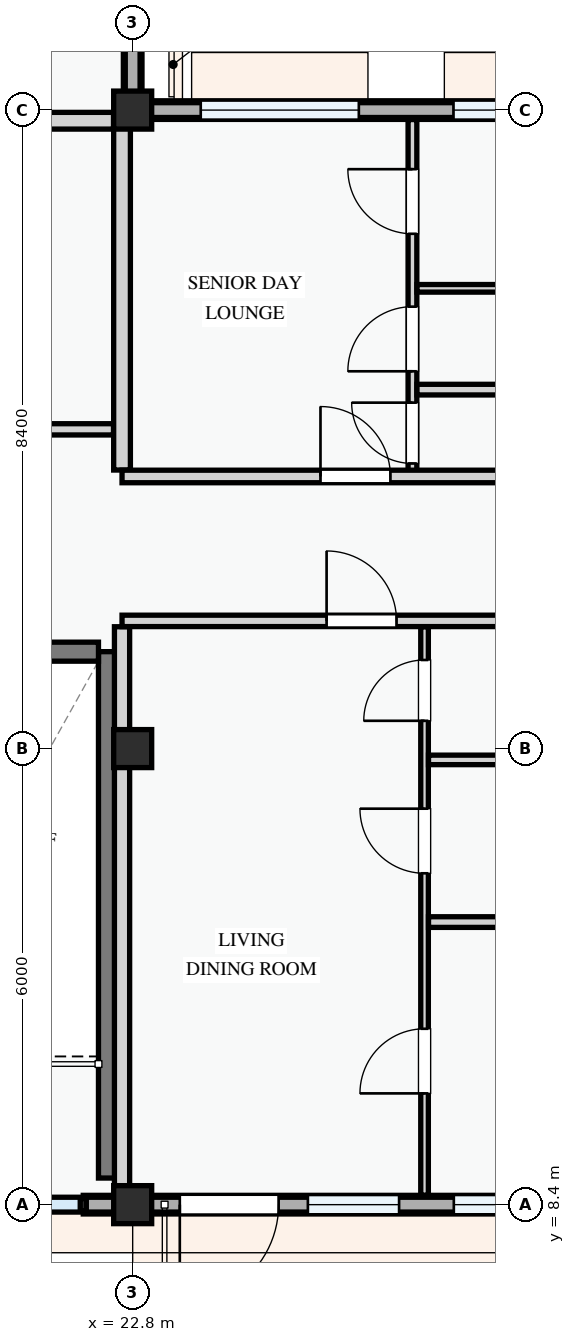
"""IFC4 building model, lengths in metres.
Left out: names, types, materials, properties, quantities, classifications, styles, units other than length and angle.
Written with IfcOpenShell. Run it as: python <this file> out.ifc"""

import sys

from ifc_helpers import new_model, si_unit, direction, frame, frame_2d, origin, origin_2d, place, context, subcontext, project, spatial, polyline, rectangle, outline, extrude, element, fill, save


model = new_model("IFC4")
c1 = context("Model", 3, precision=1e-05, world=origin(), true_north=direction((0.0, 1.0)))
c2 = subcontext(c1, "Body", "Model", "MODEL_VIEW")
j1 = project(units=[si_unit("LENGTHUNIT", "METRE"), si_unit("PLANEANGLEUNIT", "RADIAN")], contexts=[c1])
p1 = place(None, origin())
s1 = spatial("IfcSite", under=j1, at=p1, CompositionType="ELEMENT")
p2 = place(p1, origin())
s2 = spatial("IfcBuilding", under=s1, at=p2, CompositionType="ELEMENT")
p3 = place(p2, frame((0.0, 0.0, 34.5)))
s3 = spatial("IfcBuildingStorey", under=s2, at=p3, CompositionType="ELEMENT", Elevation=34.5)
for number, where, z_axis, x_axis in (
    (1, (22.8, 8.4, 0.0), (0.0, 0.0, 1.0), (1.0, 0.0, 0.0)),
    (2, (22.8, 14.4, 0.0), (0.0, 0.0, 1.0), (1.0, 0.0, 0.0)),
    (3, (22.8, 22.8, 0.0), (0.0, 0.0, 1.0), (1.0, 0.0, 0.0)),
):
    element("IfcColumn", number, at=place(p3, frame(where, z_axis=z_axis, x_axis=x_axis)), inside=s3, PredefinedType="COLUMN", context=c2, shape_type="SweptSolid", body=[
        extrude(rectangle(XDim=0.5, YDim=0.5, at=origin_2d()), origin(), (0.0, 0.0, 1.0), 3.3),
    ])
p4 = place(p3, frame((22.8, 22.8, 0.0), z_axis=(0.0, 0.0, 1.0), x_axis=(0.0, 1.0, 0.0)))
e4 = element("IfcWall", 4, at=p4, inside=s3, PredefinedType="STANDARD", context=c2, shape_type="SweptSolid", body=[
    extrude(rectangle(XDim=6.0, YDim=0.245, at=frame_2d((3.0, 0.0))), origin(), (0.0, 0.0, 1.0), 2.575),
])
p5 = place(p4, frame((1.285, 0.0, 0.78)))
e5 = element("IfcOpeningElement", 5, at=p5, cuts=e4, PredefinedType="OPENING", context=c2, shape_type="SweptSolid", body=[
    extrude(rectangle(XDim=1.3, YDim=1.4, at=frame_2d((0.65, 0.7))), frame((0.0, 0.133, 0.0), z_axis=(0.0, -1.0, 0.0), x_axis=(1.0, 0.0, 0.0)), (0.0, 0.0, 1.0), 0.265),
])
p6 = place(p4, frame((4.271, 0.0, 0.78)))
e6 = element("IfcOpeningElement", 6, at=p6, cuts=e4, PredefinedType="OPENING", context=c2, shape_type="SweptSolid", body=[
    extrude(rectangle(XDim=0.95, YDim=1.15, at=frame_2d((0.475, 0.575))), frame((0.0, 0.133, 0.0), z_axis=(0.0, -1.0, 0.0), x_axis=(1.0, 0.0, 0.0)), (0.0, 0.0, 1.0), 0.265),
])
p7 = place(p3, frame((22.15, 8.4, 0.0), z_axis=(0.0, 0.0, 1.0), x_axis=(1.0, 0.0, 0.0)))
e7 = element("IfcWall", 7, at=p7, inside=s3, PredefinedType="STANDARD", context=c2, shape_type="SweptSolid", body=[
    extrude(rectangle(XDim=0.65, YDim=0.245, at=frame_2d((0.325, 0.0))), origin(), (0.0, 0.0, 1.0), 3.04),
])
p8 = place(p3, frame((22.8, 8.4, 0.0), z_axis=(0.0, 0.0, 1.0), x_axis=(1.0, 0.0, 0.0)))
e8 = element("IfcWall", 8, at=p8, inside=s3, PredefinedType="STANDARD", context=c2, shape_type="SweptSolid", body=[
    extrude(rectangle(XDim=6.0, YDim=0.245, at=frame_2d((3.0, 0.0))), origin(), (0.0, 0.0, 1.0), 2.525),
])
p9 = place(p8, frame((0.62, 0.0, 0.0)))
e9 = element("IfcOpeningElement", 9, at=p9, cuts=e8, PredefinedType="OPENING", context=c2, shape_type="SweptSolid", body=[
    extrude(rectangle(XDim=1.3, YDim=2.15, at=frame_2d((0.65, 1.075))), frame((0.0, 0.133, 0.0), z_axis=(0.0, -1.0, 0.0), x_axis=(1.0, 0.0, 0.0)), (0.0, 0.0, 1.0), 0.265),
])
p10 = place(p8, frame((2.305, 0.0, 0.78)))
e10 = element("IfcOpeningElement", 10, at=p10, cuts=e8, PredefinedType="OPENING", context=c2, shape_type="SweptSolid", body=[
    extrude(rectangle(XDim=1.2, YDim=1.5, at=frame_2d((0.6, 0.75))), frame((0.0, 0.133, 0.0), z_axis=(0.0, -1.0, 0.0), x_axis=(1.0, 0.0, 0.0)), (0.0, 0.0, 1.0), 0.265),
])
p11 = place(p8, frame((4.225, 0.0, 0.78)))
e11 = element("IfcOpeningElement", 11, at=p11, cuts=e8, PredefinedType="OPENING", context=c2, shape_type="SweptSolid", body=[
    extrude(rectangle(XDim=1.2, YDim=1.35, at=frame_2d((0.6, 0.675))), frame((0.0, 0.133, 0.0), z_axis=(0.0, -1.0, 0.0), x_axis=(1.0, 0.0, 0.0)), (0.0, 0.0, 1.0), 0.265),
])
p12 = place(p3, frame((28.8, 22.8, 0.0), z_axis=(0.0, 0.0, 1.0), x_axis=(-1.0, 0.0, 0.0)))
e12 = element("IfcWall", 12, at=p12, inside=s3, PredefinedType="STANDARD", context=c2, shape_type="SweptSolid", body=[
    extrude(rectangle(XDim=6.0, YDim=0.245, at=frame_2d((3.0, 0.0))), origin(), (0.0, 0.0, 1.0), 2.525),
])
p13 = place(p12, frame((0.729, 0.0, 0.78)))
e13 = element("IfcOpeningElement", 13, at=p13, cuts=e12, PredefinedType="OPENING", context=c2, shape_type="SweptSolid", body=[
    extrude(rectangle(XDim=1.05, YDim=1.2, at=frame_2d((0.525, 0.6))), frame((0.0, 0.133, 0.0), z_axis=(0.0, -1.0, 0.0), x_axis=(1.0, 0.0, 0.0)), (0.0, 0.0, 1.0), 0.265),
])
p14 = place(p12, frame((3.025, 0.0, 0.78)))
e14 = element("IfcOpeningElement", 14, at=p14, cuts=e12, PredefinedType="OPENING", context=c2, shape_type="SweptSolid", body=[
    extrude(rectangle(XDim=2.08, YDim=1.52, at=frame_2d((1.04, 0.76))), frame((0.0, 0.133, 0.0), z_axis=(0.0, -1.0, 0.0), x_axis=(1.0, 0.0, 0.0)), (0.0, 0.0, 1.0), 0.265),
])
p15 = place(p3, frame((22.8, 22.8, 3.3), z_axis=(0.0, 0.0, 1.0), x_axis=(0.0, 1.0, 0.0)))
e15 = element("IfcWall", 15, at=p15, inside=s3, PredefinedType="PARAPET", context=c2, shape_type="SweptSolid", body=[
    extrude(rectangle(XDim=20.4, YDim=0.195, at=frame_2d((10.2, 0.0))), origin(), (0.0, 0.0, 1.0), 1.15),
])
p16 = place(p3, frame((14.4, 8.4, 3.3), z_axis=(0.0, 0.0, 1.0), x_axis=(1.0, 0.0, 0.0)))
e16 = element("IfcWall", 16, at=p16, inside=s3, PredefinedType="PARAPET", context=c2, shape_type="SweptSolid", body=[
    extrude(outline(polyline([(0.0, 0.0), (8.4, 0.0), (8.4, 1.12), (7.7, 1.322), (7.0, 1.484), (6.3, 1.618), (5.6, 1.717), (4.9, 1.779), (4.2, 1.8), (3.5, 1.779), (2.8, 1.717), (2.1, 1.618), (1.4, 1.484), (0.7, 1.322), (0.0, 1.12), (0.0, 0.0)])), frame((0.0, 0.098, 0.0), z_axis=(0.0, -1.0, 0.0), x_axis=(1.0, 0.0, 0.0)), (0.0, 0.0, 1.0), 0.195),
])
p17 = place(p3, frame((22.8, 8.4, 3.3), z_axis=(0.0, 0.0, 1.0), x_axis=(1.0, 0.0, 0.0)))
e17 = element("IfcWall", 17, at=p17, inside=s3, PredefinedType="PARAPET", context=c2, shape_type="SweptSolid", body=[
    extrude(outline(polyline([(0.0, 0.0), (6.0, 0.0), (6.0, 1.12), (5.5, 1.322), (5.0, 1.484), (4.5, 1.618), (4.0, 1.717), (3.5, 1.779), (3.0, 1.8), (2.5, 1.779), (2.0, 1.717), (1.5, 1.618), (1.0, 1.484), (0.5, 1.322), (0.0, 1.12), (0.0, 0.0)])), frame((0.0, 0.098, 0.0), z_axis=(0.0, -1.0, 0.0), x_axis=(1.0, 0.0, 0.0)), (0.0, 0.0, 1.0), 0.195),
])
p18 = place(p3, frame((43.2, 22.8, 3.3), z_axis=(0.0, 0.0, 1.0), x_axis=(-1.0, 0.0, 0.0)))
e18 = element("IfcWall", 18, at=p18, inside=s3, PredefinedType="PARAPET", context=c2, shape_type="SweptSolid", body=[
    extrude(rectangle(XDim=20.4, YDim=0.195, at=frame_2d((10.2, 0.0))), origin(), (0.0, 0.0, 1.0), 1.15),
])
p19 = place(p3, frame((22.475, 8.75, 0.0), z_axis=(0.0, 0.0, 1.0), x_axis=(0.0, 1.0, 0.0)))
e19 = element("IfcWall", 19, at=p19, inside=s3, PredefinedType="SHEAR", context=c2, shape_type="SweptSolid", body=[
    extrude(rectangle(XDim=6.925, YDim=0.25, at=frame_2d((3.462, 0.0))), origin(), (0.0, 0.0, 1.0), 3.0),
])
p20 = place(p3, frame((8.85, 15.675, 0.0), z_axis=(0.0, 0.0, 1.0), x_axis=(1.0, 0.0, 0.0)))
e20 = element("IfcWall", 20, at=p20, inside=s3, PredefinedType="SHEAR", context=c2, shape_type="SweptSolid", body=[
    extrude(rectangle(XDim=13.5, YDim=0.25, at=frame_2d((6.75, 0.0))), origin(), (0.0, 0.0, 1.0), 3.0),
])
p21 = place(p20, frame((6.2, 0.0, 0.0)))
e21 = element("IfcOpeningElement", 21, at=p21, cuts=e20, PredefinedType="OPENING", context=c2, shape_type="SweptSolid", body=[
    extrude(rectangle(XDim=1.1, YDim=2.15, at=frame_2d((0.55, 1.075))), frame((0.0, 0.135, 0.0), z_axis=(0.0, -1.0, 0.0), x_axis=(1.0, 0.0, 0.0)), (0.0, 0.0, 1.0), 0.27),
])
p22 = place(p3, frame((18.025, 18.6, 0.0), z_axis=(0.0, 0.0, 1.0), x_axis=(1.0, 0.0, 0.0)))
e22 = element("IfcWall", 22, at=p22, inside=s3, PredefinedType="PARTITIONING", context=c2, shape_type="SweptSolid", body=[
    extrude(rectangle(XDim=4.523, YDim=0.148, at=frame_2d((2.262, 0.0))), origin(), (0.0, 0.0, 1.0), 3.0),
])
p23 = place(p22, frame((1.65, 0.0, 0.0)))
e23 = element("IfcOpeningElement", 23, at=p23, cuts=e22, PredefinedType="OPENING", context=c2, shape_type="SweptSolid", body=[
    extrude(rectangle(XDim=1.0, YDim=2.15, at=frame_2d((0.5, 1.075))), frame((0.0, 0.084, 0.0), z_axis=(0.0, -1.0, 0.0), x_axis=(1.0, 0.0, 0.0)), (0.0, 0.0, 1.0), 0.168),
])
p24 = place(p3, frame((18.064, 22.66, 0.0), z_axis=(0.0, 0.0, 1.0), x_axis=(1.0, 0.0, 0.0)))
e24 = element("IfcWall", 24, at=p24, inside=s3, PredefinedType="PARTITIONING", context=c2, shape_type="SweptSolid", body=[
    extrude(rectangle(XDim=4.484, YDim=0.22, at=frame_2d((2.242, 0.0))), origin(), (0.0, 0.0, 1.0), 2.375),
])
p25 = place(p3, frame((26.64, 8.524, 0.0), z_axis=(0.0, 0.0, 1.0), x_axis=(0.0, 1.0, 0.0)))
e25 = element("IfcWall", 25, at=p25, inside=s3, PredefinedType="PARTITIONING", context=c2, shape_type="SweptSolid", body=[
    extrude(rectangle(XDim=7.479, YDim=0.1, at=frame_2d((3.739, 0.0))), origin(), (0.0, 0.0, 1.0), 3.0),
])
p26 = place(p25, frame((1.339, 0.0, 0.0)))
e26 = element("IfcOpeningElement", 26, at=p26, cuts=e25, PredefinedType="OPENING", context=c2, shape_type="SweptSolid", body=[
    extrude(rectangle(XDim=0.85, YDim=2.1, at=frame_2d((0.425, 1.05))), frame((0.0, 0.06, 0.0), z_axis=(0.0, -1.0, 0.0), x_axis=(1.0, 0.0, 0.0)), (0.0, 0.0, 1.0), 0.12),
])
p27 = place(p25, frame((4.235, 0.0, 0.0)))
e27 = element("IfcOpeningElement", 27, at=p27, cuts=e25, PredefinedType="OPENING", context=c2, shape_type="SweptSolid", body=[
    extrude(rectangle(XDim=0.85, YDim=2.1, at=frame_2d((0.425, 1.05))), frame((0.0, 0.06, 0.0), z_axis=(0.0, -1.0, 0.0), x_axis=(1.0, 0.0, 0.0)), (0.0, 0.0, 1.0), 0.12),
])
p28 = place(p25, frame((6.241, 0.0, 0.0)))
e28 = element("IfcOpeningElement", 28, at=p28, cuts=e25, PredefinedType="OPENING", context=c2, shape_type="SweptSolid", body=[
    extrude(rectangle(XDim=0.8, YDim=2.1, at=frame_2d((0.4, 1.05))), frame((0.0, 0.06, 0.0), z_axis=(0.0, -1.0, 0.0), x_axis=(1.0, 0.0, 0.0)), (0.0, 0.0, 1.0), 0.12),
])
p29 = place(p3, frame((26.692, 12.118, 0.0), z_axis=(0.0, 0.0, 1.0), x_axis=(1.0, 0.0, 0.0)))
e29 = element("IfcWall", 29, at=p29, inside=s3, PredefinedType="PARTITIONING", context=c2, shape_type="SweptSolid", body=[
    extrude(rectangle(XDim=3.833, YDim=0.14, at=frame_2d((1.917, 0.0))), origin(), (0.0, 0.0, 1.0), 3.0),
])
p30 = place(p3, frame((26.692, 14.251, 0.0), z_axis=(0.0, 0.0, 1.0), x_axis=(1.0, 0.0, 0.0)))
e30 = element("IfcWall", 30, at=p30, inside=s3, PredefinedType="PARTITIONING", context=c2, shape_type="SweptSolid", body=[
    extrude(rectangle(XDim=3.833, YDim=0.125, at=frame_2d((1.917, 0.0))), origin(), (0.0, 0.0, 1.0), 2.375),
])
p31 = place(p3, frame((26.481, 17.98, 0.0), z_axis=(0.0, 0.0, 1.0), x_axis=(0.0, 1.0, 0.0)))
e31 = element("IfcWall", 31, at=p31, inside=s3, PredefinedType="PARTITIONING", context=c2, shape_type="SweptSolid", body=[
    extrude(rectangle(XDim=4.696, YDim=0.115, at=frame_2d((2.348, 0.0))), origin(), (0.0, 0.0, 1.0), 3.0),
])
p32 = place(p31, frame((0.171, 0.0, 0.0)))
e32 = element("IfcOpeningElement", 32, at=p32, cuts=e31, PredefinedType="OPENING", context=c2, shape_type="SweptSolid", body=[
    extrude(rectangle(XDim=0.8, YDim=2.1, at=frame_2d((0.4, 1.05))), frame((0.0, 0.067, 0.0), z_axis=(0.0, -1.0, 0.0), x_axis=(1.0, 0.0, 0.0)), (0.0, 0.0, 1.0), 0.135),
])
p33 = place(p31, frame((1.384, 0.0, 0.0)))
e33 = element("IfcOpeningElement", 33, at=p33, cuts=e31, PredefinedType="OPENING", context=c2, shape_type="SweptSolid", body=[
    extrude(rectangle(XDim=0.85, YDim=2.1, at=frame_2d((0.425, 1.05))), frame((0.0, 0.067, 0.0), z_axis=(0.0, -1.0, 0.0), x_axis=(1.0, 0.0, 0.0)), (0.0, 0.0, 1.0), 0.135),
])
p34 = place(p31, frame((3.193, 0.0, 0.0)))
e34 = element("IfcOpeningElement", 34, at=p34, cuts=e31, PredefinedType="OPENING", context=c2, shape_type="SweptSolid", body=[
    extrude(rectangle(XDim=0.85, YDim=2.1, at=frame_2d((0.425, 1.05))), frame((0.0, 0.067, 0.0), z_axis=(0.0, -1.0, 0.0), x_axis=(1.0, 0.0, 0.0)), (0.0, 0.0, 1.0), 0.135),
])
p35 = place(p3, frame((26.54, 20.455, 0.0), z_axis=(0.0, 0.0, 1.0), x_axis=(1.0, 0.0, 0.0)))
e35 = element("IfcWall", 35, at=p35, inside=s3, PredefinedType="PARTITIONING", context=c2, shape_type="SweptSolid", body=[
    extrude(rectangle(XDim=3.978, YDim=0.1, at=frame_2d((1.989, 0.0))), origin(), (0.0, 0.0, 1.0), 3.0),
])
p36 = place(p3, frame((26.54, 19.122, 0.0), z_axis=(0.0, 0.0, 1.0), x_axis=(1.0, 0.0, 0.0)))
e36 = element("IfcWall", 36, at=p36, inside=s3, PredefinedType="PARTITIONING", context=c2, shape_type="SweptSolid", body=[
    extrude(rectangle(XDim=3.978, YDim=0.14, at=frame_2d((1.989, 0.0))), origin(), (0.0, 0.0, 1.0), 3.0),
])
p37 = place(p3, frame((22.66, 8.524, 0.0), z_axis=(0.0, 0.0, 1.0), x_axis=(0.0, 1.0, 0.0)))
e37 = element("IfcWall", 37, at=p37, inside=s3, PredefinedType="PARTITIONING", context=c2, shape_type="SweptSolid", body=[
    extrude(rectangle(XDim=7.479, YDim=0.2, at=frame_2d((3.739, 0.0))), origin(), (0.0, 0.0, 1.0), 2.425),
])
p38 = place(p3, frame((22.66, 18.064, 0.0), z_axis=(0.0, 0.0, 1.0), x_axis=(0.0, 1.0, 0.0)))
e38 = element("IfcWall", 38, at=p38, inside=s3, PredefinedType="PARTITIONING", context=c2, shape_type="SweptSolid", body=[
    extrude(rectangle(XDim=4.676, YDim=0.22, at=frame_2d((2.338, 0.0))), origin(), (0.0, 0.0, 1.0), 2.425),
])
p39 = place(p3, frame((22.66, 16.08, 0.0), z_axis=(0.0, 0.0, 1.0), x_axis=(1.0, 0.0, 0.0)))
e39 = element("IfcWall", 39, at=p39, inside=s3, PredefinedType="PARTITIONING", context=c2, shape_type="SweptSolid", body=[
    extrude(rectangle(XDim=20.416, YDim=0.15, at=frame_2d((10.208, 0.0))), origin(), (0.0, 0.0, 1.0), 3.0),
])
p40 = place(p39, frame((2.691, 0.0, 0.0)))
e40 = element("IfcOpeningElement", 40, at=p40, cuts=e39, PredefinedType="OPENING", context=c2, shape_type="SweptSolid", body=[
    extrude(rectangle(XDim=0.92, YDim=2.1, at=frame_2d((0.46, 1.05))), frame((0.0, 0.085, 0.0), z_axis=(0.0, -1.0, 0.0), x_axis=(1.0, 0.0, 0.0)), (0.0, 0.0, 1.0), 0.17),
])
p41 = place(p39, frame((9.91, 0.0, 0.0)))
e41 = element("IfcOpeningElement", 41, at=p41, cuts=e39, PredefinedType="OPENING", context=c2, shape_type="SweptSolid", body=[
    extrude(rectangle(XDim=0.92, YDim=2.1, at=frame_2d((0.46, 1.05))), frame((0.0, 0.085, 0.0), z_axis=(0.0, -1.0, 0.0), x_axis=(1.0, 0.0, 0.0)), (0.0, 0.0, 1.0), 0.17),
])
p42 = place(p3, frame((22.66, 17.98, 0.0), z_axis=(0.0, 0.0, 1.0), x_axis=(1.0, 0.0, 0.0)))
e42 = element("IfcWall", 42, at=p42, inside=s3, PredefinedType="PARTITIONING", context=c2, shape_type="SweptSolid", body=[
    extrude(rectangle(XDim=20.416, YDim=0.165, at=frame_2d((10.208, 0.0))), origin(), (0.0, 0.0, 1.0), 3.0),
])
p43 = place(p42, frame((2.611, 0.0, 0.0)))
e43 = element("IfcOpeningElement", 43, at=p43, cuts=e42, PredefinedType="OPENING", context=c2, shape_type="SweptSolid", body=[
    extrude(rectangle(XDim=0.92, YDim=2.1, at=frame_2d((0.46, 1.05))), frame((0.0, 0.093, 0.0), z_axis=(0.0, -1.0, 0.0), x_axis=(1.0, 0.0, 0.0)), (0.0, 0.0, 1.0), 0.185),
])
p44 = place(p42, frame((9.885, 0.0, 0.0)))
e44 = element("IfcOpeningElement", 44, at=p44, cuts=e42, PredefinedType="OPENING", context=c2, shape_type="SweptSolid", body=[
    extrude(rectangle(XDim=0.96, YDim=2.12, at=frame_2d((0.48, 1.06))), frame((0.0, 0.093, 0.0), z_axis=(0.0, -1.0, 0.0), x_axis=(1.0, 0.0, 0.0)), (0.0, 0.0, 1.0), 0.185),
])
p45 = place(p9, frame((1.3, 0.0, 0.0), z_axis=(0.0, 0.0, 1.0), x_axis=(-1.0, 0.0, 0.0)))
e45 = element("IfcDoor", 45, at=p45, inside=s3, OperationType="SINGLE_SWING_RIGHT", PredefinedType="DOOR", context=c2, shape_type="SweptSolid", body=[
    extrude(rectangle(XDim=1.3, YDim=2.15, at=frame_2d((0.65, 1.075))), frame((0.0, 0.025, 0.0), z_axis=(0.0, -1.0, 0.0), x_axis=(1.0, 0.0, 0.0)), (0.0, 0.0, 1.0), 0.05),
])
fill(e9, e45)
p46 = place(p10, origin())
e46 = element("IfcWindow", 46, at=p46, inside=s3, PartitioningType="SINGLE_PANEL", PredefinedType="WINDOW", context=c2, shape_type="SweptSolid", body=[
    extrude(rectangle(XDim=1.2, YDim=1.5, at=frame_2d((0.6, 0.75))), frame((0.0, 0.03, 0.0), z_axis=(0.0, -1.0, 0.0), x_axis=(1.0, 0.0, 0.0)), (0.0, 0.0, 1.0), 0.06),
])
fill(e10, e46)
p47 = place(p11, origin())
e47 = element("IfcWindow", 47, at=p47, inside=s3, PartitioningType="SINGLE_PANEL", PredefinedType="WINDOW", context=c2, shape_type="SweptSolid", body=[
    extrude(rectangle(XDim=1.2, YDim=1.35, at=frame_2d((0.6, 0.675))), frame((0.0, 0.03, 0.0), z_axis=(0.0, -1.0, 0.0), x_axis=(1.0, 0.0, 0.0)), (0.0, 0.0, 1.0), 0.06),
])
fill(e11, e47)
p48 = place(p13, origin())
e48 = element("IfcWindow", 48, at=p48, inside=s3, PartitioningType="SINGLE_PANEL", PredefinedType="WINDOW", context=c2, shape_type="SweptSolid", body=[
    extrude(rectangle(XDim=1.05, YDim=1.2, at=frame_2d((0.525, 0.6))), frame((0.0, 0.03, 0.0), z_axis=(0.0, -1.0, 0.0), x_axis=(1.0, 0.0, 0.0)), (0.0, 0.0, 1.0), 0.06),
])
fill(e13, e48)
p49 = place(p14, origin())
e49 = element("IfcWindow", 49, at=p49, inside=s3, PartitioningType="DOUBLE_PANEL_VERTICAL", PredefinedType="WINDOW", context=c2, shape_type="SweptSolid", body=[
    extrude(rectangle(XDim=2.08, YDim=1.52, at=frame_2d((1.04, 0.76))), frame((0.0, 0.03, 0.0), z_axis=(0.0, -1.0, 0.0), x_axis=(1.0, 0.0, 0.0)), (0.0, 0.0, 1.0), 0.06),
])
fill(e14, e49)
p50 = place(p26, origin())
e50 = element("IfcDoor", 50, at=p50, inside=s3, OperationType="SINGLE_SWING_LEFT", PredefinedType="DOOR", context=c2, shape_type="SweptSolid", body=[
    extrude(rectangle(XDim=0.85, YDim=2.1, at=frame_2d((0.425, 1.05))), frame((0.0, 0.025, 0.0), z_axis=(0.0, -1.0, 0.0), x_axis=(1.0, 0.0, 0.0)), (0.0, 0.0, 1.0), 0.05),
])
fill(e26, e50)
p51 = place(p27, origin())
e51 = element("IfcDoor", 51, at=p51, inside=s3, OperationType="SINGLE_SWING_RIGHT", PredefinedType="DOOR", context=c2, shape_type="SweptSolid", body=[
    extrude(rectangle(XDim=0.85, YDim=2.1, at=frame_2d((0.425, 1.05))), frame((0.0, 0.025, 0.0), z_axis=(0.0, -1.0, 0.0), x_axis=(1.0, 0.0, 0.0)), (0.0, 0.0, 1.0), 0.05),
])
fill(e27, e51)
p52 = place(p28, origin())
e52 = element("IfcDoor", 52, at=p52, inside=s3, OperationType="SINGLE_SWING_LEFT", PredefinedType="DOOR", context=c2, shape_type="SweptSolid", body=[
    extrude(rectangle(XDim=0.8, YDim=2.1, at=frame_2d((0.4, 1.05))), frame((0.0, 0.025, 0.0), z_axis=(0.0, -1.0, 0.0), x_axis=(1.0, 0.0, 0.0)), (0.0, 0.0, 1.0), 0.05),
])
fill(e28, e52)
p53 = place(p32, origin())
e53 = element("IfcDoor", 53, at=p53, inside=s3, OperationType="SINGLE_SWING_RIGHT", PredefinedType="DOOR", context=c2, shape_type="SweptSolid", body=[
    extrude(rectangle(XDim=0.8, YDim=2.1, at=frame_2d((0.4, 1.05))), frame((0.0, 0.025, 0.0), z_axis=(0.0, -1.0, 0.0), x_axis=(1.0, 0.0, 0.0)), (0.0, 0.0, 1.0), 0.05),
])
fill(e32, e53)
p54 = place(p33, origin())
e54 = element("IfcDoor", 54, at=p54, inside=s3, OperationType="SINGLE_SWING_LEFT", PredefinedType="DOOR", context=c2, shape_type="SweptSolid", body=[
    extrude(rectangle(XDim=0.85, YDim=2.1, at=frame_2d((0.425, 1.05))), frame((0.0, 0.025, 0.0), z_axis=(0.0, -1.0, 0.0), x_axis=(1.0, 0.0, 0.0)), (0.0, 0.0, 1.0), 0.05),
])
fill(e33, e54)
p55 = place(p34, origin())
e55 = element("IfcDoor", 55, at=p55, inside=s3, OperationType="SINGLE_SWING_RIGHT", PredefinedType="DOOR", context=c2, shape_type="SweptSolid", body=[
    extrude(rectangle(XDim=0.85, YDim=2.1, at=frame_2d((0.425, 1.05))), frame((0.0, 0.025, 0.0), z_axis=(0.0, -1.0, 0.0), x_axis=(1.0, 0.0, 0.0)), (0.0, 0.0, 1.0), 0.05),
])
fill(e34, e55)
p56 = place(p40, origin())
e56 = element("IfcDoor", 56, at=p56, inside=s3, OperationType="SINGLE_SWING_LEFT", PredefinedType="DOOR", context=c2, shape_type="SweptSolid", body=[
    extrude(rectangle(XDim=0.92, YDim=2.1, at=frame_2d((0.46, 1.05))), frame((0.0, 0.025, 0.0), z_axis=(0.0, -1.0, 0.0), x_axis=(1.0, 0.0, 0.0)), (0.0, 0.0, 1.0), 0.05),
])
fill(e40, e56)
p57 = place(p43, origin())
e57 = element("IfcDoor", 57, at=p57, inside=s3, OperationType="SINGLE_SWING_LEFT", PredefinedType="DOOR", context=c2, shape_type="SweptSolid", body=[
    extrude(rectangle(XDim=0.92, YDim=2.1, at=frame_2d((0.46, 1.05))), frame((0.0, 0.025, 0.0), z_axis=(0.0, -1.0, 0.0), x_axis=(1.0, 0.0, 0.0)), (0.0, 0.0, 1.0), 0.05),
])
fill(e43, e57)
save(model, sys.argv[1])
